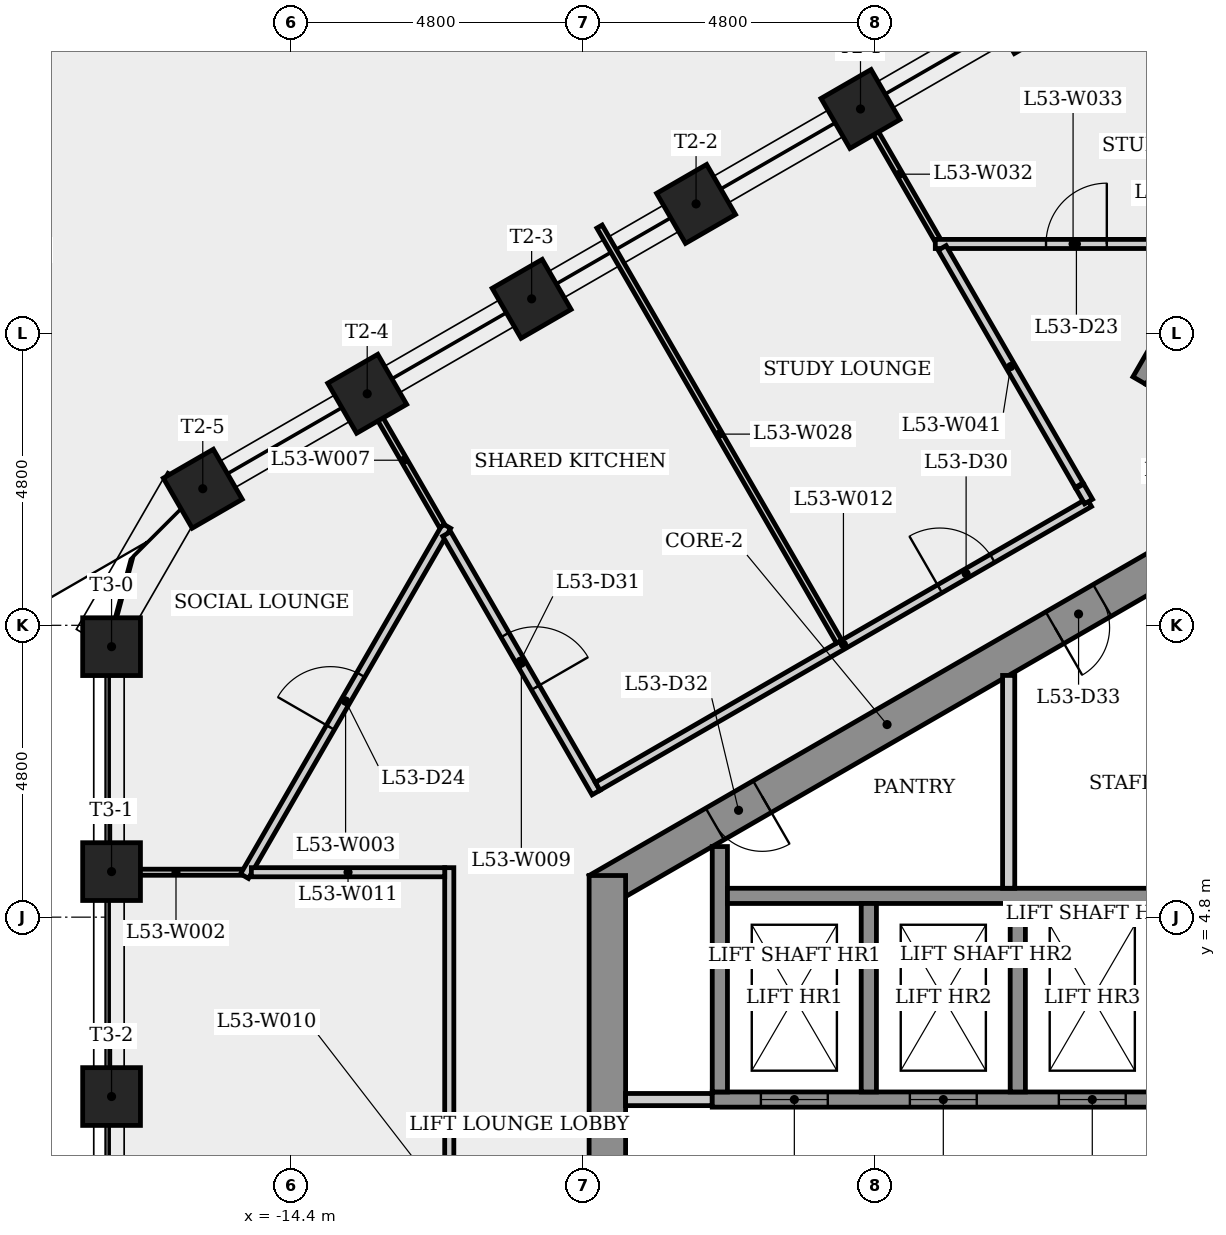
"""IFC4 building model, lengths in metres.
Left out: names, types, materials, properties, quantities, classifications, styles, units other than length and angle.
Written with IfcOpenShell. Run it as: python <this file> out.ifc"""

import sys

from ifc_helpers import new_model, si_unit, direction, frame, frame_2d, origin, origin_2d, place, context, subcontext, project, spatial, rectangle, extrude, element, fill, save


model = new_model("IFC4")
c1 = context("Model", 3, precision=1e-05, world=origin(), true_north=direction((0.0, 1.0)))
c2 = subcontext(c1, "Body", "Model", "MODEL_VIEW")
j1 = project(units=[si_unit("LENGTHUNIT", "METRE"), si_unit("PLANEANGLEUNIT", "RADIAN")], contexts=[c1])
p1 = place(None, origin())
s1 = spatial("IfcSite", under=j1, at=p1, CompositionType="ELEMENT")
p2 = place(p1, origin())
s2 = spatial("IfcBuilding", under=s1, at=p2, CompositionType="ELEMENT")
p3 = place(p2, frame((0.0, 0.0, 198.7)))
s3 = spatial("IfcBuildingStorey", under=s2, at=p3, CompositionType="ELEMENT", Elevation=198.7)
p4 = place(p3, frame((0.15, 10.71, 0.0), z_axis=(0.0, 0.0, 1.0), x_axis=(-0.866023993627, -0.500002442456, 0.0)))
e1 = element("IfcWall", 1, at=p4, inside=s3, PredefinedType="SHEAR", context=c2, shape_type="SweptSolid", body=[
    extrude(rectangle(XDim=10.97, YDim=0.6, at=frame_2d((5.485, 0.0))), origin(), (0.0, 0.0, 1.0), 3.4),
])
p5 = place(p4, frame((7.855, 0.0, 0.0)))
e2 = element("IfcOpeningElement", 2, at=p5, cuts=e1, PredefinedType="OPENING", context=c2, shape_type="SweptSolid", body=[
    extrude(rectangle(XDim=0.9, YDim=2.1, at=frame_2d((0.45, 1.05))), frame((0.0, 0.31, 0.0), z_axis=(0.0, -1.0, 0.0), x_axis=(1.0, 0.0, 0.0)), (0.0, 0.0, 1.0), 0.62),
])
p6 = place(p4, frame((1.398, 0.0, 0.0)))
e3 = element("IfcOpeningElement", 3, at=p6, cuts=e1, PredefinedType="OPENING", context=c2, shape_type="SweptSolid", body=[
    extrude(rectangle(XDim=0.9, YDim=2.1, at=frame_2d((0.45, 1.05))), frame((0.0, 0.31, 0.0), z_axis=(0.0, -1.0, 0.0), x_axis=(1.0, 0.0, 0.0)), (0.0, 0.0, 1.0), 0.62),
])
p7 = place(p3, frame((-9.2, 5.485, 0.0), z_axis=(0.0, 0.0, 1.0), x_axis=(0.0, -1.0, 0.0)))
e4 = element("IfcWall", 4, at=p7, inside=s3, PredefinedType="SHEAR", context=c2, shape_type="SweptSolid", body=[
    extrude(rectangle(XDim=10.97, YDim=0.6, at=frame_2d((5.485, 0.0))), origin(), (0.0, 0.0, 1.0), 3.4),
])
p8 = place(p7, frame((8.516, 0.0, 0.0)))
e5 = element("IfcOpeningElement", 5, at=p8, cuts=e4, PredefinedType="OPENING", context=c2, shape_type="SweptSolid", body=[
    extrude(rectangle(XDim=0.9, YDim=2.1, at=frame_2d((0.45, 1.05))), frame((0.0, 0.31, 0.0), z_axis=(0.0, -1.0, 0.0), x_axis=(1.0, 0.0, 0.0)), (0.0, 0.0, 1.0), 0.62),
])
p9 = place(p7, frame((4.685, 0.0, 0.0)))
e6 = element("IfcOpeningElement", 6, at=p9, cuts=e4, PredefinedType="OPENING", context=c2, shape_type="SweptSolid", body=[
    extrude(rectangle(XDim=1.6, YDim=2.1, at=frame_2d((0.8, 1.05))), frame((0.0, 0.31, 0.0), z_axis=(0.0, -1.0, 0.0), x_axis=(1.0, 0.0, 0.0)), (0.0, 0.0, 1.0), 0.62),
])
for number, where, z_axis, x_axis in (
    (7, (-2.333, 19.653, 0.0), (0.0, 0.0, 1.0), (-0.5, 0.866, 0.0)),
    (8, (-5.037, 18.092, 0.0), (0.0, 0.0, 1.0), (-0.5, 0.866, 0.0)),
    (9, (-7.741, 16.531, 0.0), (0.0, 0.0, 1.0), (-0.5, 0.866, 0.0)),
    (10, (-10.445, 14.969, 0.0), (0.0, 0.0, 1.0), (-0.5, 0.866, 0.0)),
    (11, (-13.15, 13.408, 0.0), (0.0, 0.0, 1.0), (-0.5, 0.866, 0.0)),
    (12, (-15.854, 11.847, 0.0), (0.0, 0.0, 1.0), (-0.5, 0.866, 0.0)),
    (13, (-17.354, 9.249, 0.0), (0.0, 0.0, 1.0), (-1.0, 0.0, 0.0)),
    (14, (-17.354, 5.549, 0.0), (0.0, 0.0, 1.0), (-1.0, 0.0, 0.0)),
    (15, (-17.354, 1.85, 0.0), (0.0, 0.0, 1.0), (-1.0, 0.0, 0.0)),
):
    element("IfcColumn", number, at=place(p3, frame(where, z_axis=z_axis, x_axis=x_axis)), inside=s3, PredefinedType="COLUMN", context=c2, shape_type="SweptSolid", body=[
        extrude(rectangle(XDim=0.95, YDim=0.95, at=origin_2d()), origin(), (0.0, 0.0, 1.0), 3.4),
    ])
p10 = place(p3, frame((-15.205, 5.539, 0.0), z_axis=(0.0, 0.0, 1.0), x_axis=(-1.0, 0.0, 0.0)))
e16 = element("IfcWall", 16, at=p10, inside=s3, PredefinedType="PARTITIONING", context=c2, shape_type="SweptSolid", body=[
    extrude(rectangle(XDim=2.179, YDim=0.1, at=frame_2d((1.089, 0.0))), origin(), (0.0, 0.0, 1.0), 3.0),
])
p11 = place(p3, frame((-15.167, 5.474, 0.0), z_axis=(0.0, 0.0, 1.0), x_axis=(0.500012717347, 0.866018061296, 0.0)))
e17 = element("IfcWall", 17, at=p11, inside=s3, PredefinedType="PARTITIONING", context=c2, shape_type="SweptSolid", body=[
    extrude(rectangle(XDim=6.65, YDim=0.15, at=frame_2d((3.325, 0.0))), origin(), (0.0, 0.0, 1.0), 3.0),
])
p12 = place(p11, frame((2.825, 0.0, 0.0)))
e18 = element("IfcOpeningElement", 18, at=p12, cuts=e17, PredefinedType="OPENING", context=c2, shape_type="SweptSolid", body=[
    extrude(rectangle(XDim=1.0, YDim=2.1, at=frame_2d((0.5, 1.05))), frame((0.0, 0.085, 0.0), z_axis=(0.0, -1.0, 0.0), x_axis=(1.0, 0.0, 0.0)), (0.0, 0.0, 1.0), 0.17),
])
p13 = place(p3, frame((-13.167, 13.398, 0.0), z_axis=(0.0, 0.0, 1.0), x_axis=(0.500046524342, -0.865998541277, 0.0)))
e19 = element("IfcWall", 19, at=p13, inside=s3, PredefinedType="PARTITIONING", context=c2, shape_type="SweptSolid", body=[
    extrude(rectangle(XDim=2.5, YDim=0.1, at=frame_2d((1.25, 0.0))), origin(), (0.0, 0.0, 1.0), 3.0),
])
p14 = place(p3, frame((-11.843, 11.103, 0.0), z_axis=(0.0, 0.0, 1.0), x_axis=(0.500015046984, -0.86601671623, 0.0)))
e20 = element("IfcWall", 20, at=p14, inside=s3, PredefinedType="PARTITIONING", context=c2, shape_type="SweptSolid", body=[
    extrude(rectangle(XDim=4.911, YDim=0.15, at=frame_2d((2.456, 0.0))), origin(), (0.0, 0.0, 1.0), 3.0),
])
p15 = place(p14, frame((1.918, 0.0, 0.0)))
e21 = element("IfcOpeningElement", 21, at=p15, cuts=e20, PredefinedType="OPENING", context=c2, shape_type="SweptSolid", body=[
    extrude(rectangle(XDim=1.0, YDim=2.1, at=frame_2d((0.5, 1.05))), frame((0.0, 0.085, 0.0), z_axis=(0.0, -1.0, 0.0), x_axis=(1.0, 0.0, 0.0)), (0.0, 0.0, 1.0), 0.17),
])
p16 = place(p3, frame((-11.8, -5.464, 0.0), z_axis=(0.0, 0.0, 1.0), x_axis=(0.0, 1.0, 0.0)))
e22 = element("IfcWall", 22, at=p16, inside=s3, PredefinedType="PARTITIONING", context=c2, shape_type="SweptSolid", body=[
    extrude(rectangle(XDim=11.078, YDim=0.15, at=frame_2d((5.539, 0.0))), origin(), (0.0, 0.0, 1.0), 3.0),
])
p17 = place(p16, frame((4.986, 0.0, 0.0)))
e23 = element("IfcOpeningElement", 23, at=p17, cuts=e22, PredefinedType="OPENING", context=c2, shape_type="SweptSolid", body=[
    extrude(rectangle(XDim=1.0, YDim=2.1, at=frame_2d((0.5, 1.05))), frame((0.0, 0.085, 0.0), z_axis=(0.0, -1.0, 0.0), x_axis=(1.0, 0.0, 0.0)), (0.0, 0.0, 1.0), 0.17),
])
p18 = place(p3, frame((-11.875, 5.539, 0.0), z_axis=(0.0, 0.0, 1.0), x_axis=(-1.0, 0.0, 0.0)))
e24 = element("IfcWall", 24, at=p18, inside=s3, PredefinedType="PARTITIONING", context=c2, shape_type="SweptSolid", body=[
    extrude(rectangle(XDim=3.18, YDim=0.15, at=frame_2d((1.59, 0.0))), origin(), (0.0, 0.0, 1.0), 3.0),
])
p19 = place(p3, frame((-9.359, 6.952, 0.0), z_axis=(0.0, 0.0, 1.0), x_axis=(0.866014841347, 0.500018294232, 0.0)))
e25 = element("IfcWall", 25, at=p19, inside=s3, PredefinedType="PARTITIONING", context=c2, shape_type="SweptSolid", body=[
    extrude(rectangle(XDim=9.334, YDim=0.15, at=frame_2d((4.667, 0.0))), origin(), (0.0, 0.0, 1.0), 3.0),
])
p20 = place(p19, frame((6.497, 0.0, 0.0)))
e26 = element("IfcOpeningElement", 26, at=p20, cuts=e25, PredefinedType="OPENING", context=c2, shape_type="SweptSolid", body=[
    extrude(rectangle(XDim=1.0, YDim=2.1, at=frame_2d((0.5, 1.05))), frame((0.0, 0.085, 0.0), z_axis=(0.0, -1.0, 0.0), x_axis=(1.0, 0.0, 0.0)), (0.0, 0.0, 1.0), 0.17),
])
p21 = place(p3, frame((-8.9, 1.8, 0.0), z_axis=(0.0, 0.0, 1.0), x_axis=(1.0, 0.0, 0.0)))
e27 = element("IfcWall", 27, at=p21, inside=s3, PredefinedType="PARTITIONING", context=c2, shape_type="SweptSolid", body=[
    extrude(rectangle(XDim=1.425, YDim=0.2, at=frame_2d((0.712, 0.0))), origin(), (0.0, 0.0, 1.0), 3.0),
])
p22 = place(p3, frame((-7.475, 1.8, 0.0), z_axis=(0.0, 0.0, 1.0), x_axis=(1.0, 0.0, 0.0)))
e28 = element("IfcWall", 28, at=p22, inside=s3, PredefinedType="SHEAR", context=c2, shape_type="SweptSolid", body=[
    extrude(rectangle(XDim=14.95, YDim=0.25, at=frame_2d((7.475, 0.0))), origin(), (0.0, 0.0, 1.0), 3.0),
])
p23 = place(p22, frame((0.8, 0.0, 0.0)))
e29 = element("IfcOpeningElement", 29, at=p23, cuts=e28, PredefinedType="OPENING", context=c2, shape_type="SweptSolid", body=[
    extrude(rectangle(XDim=1.1, YDim=2.1, at=frame_2d((0.55, 1.05))), frame((0.0, 0.135, 0.0), z_axis=(0.0, -1.0, 0.0), x_axis=(1.0, 0.0, 0.0)), (0.0, 0.0, 1.0), 0.27),
])
p24 = place(p22, frame((3.25, 0.0, 0.0)))
e30 = element("IfcOpeningElement", 30, at=p24, cuts=e28, PredefinedType="OPENING", context=c2, shape_type="SweptSolid", body=[
    extrude(rectangle(XDim=1.1, YDim=2.1, at=frame_2d((0.55, 1.05))), frame((0.0, 0.135, 0.0), z_axis=(0.0, -1.0, 0.0), x_axis=(1.0, 0.0, 0.0)), (0.0, 0.0, 1.0), 0.27),
])
p25 = place(p22, frame((5.7, 0.0, 0.0)))
e31 = element("IfcOpeningElement", 31, at=p25, cuts=e28, PredefinedType="OPENING", context=c2, shape_type="SweptSolid", body=[
    extrude(rectangle(XDim=1.1, YDim=2.1, at=frame_2d((0.55, 1.05))), frame((0.0, 0.135, 0.0), z_axis=(0.0, -1.0, 0.0), x_axis=(1.0, 0.0, 0.0)), (0.0, 0.0, 1.0), 0.27),
])
p26 = place(p22, frame((8.15, 0.0, 0.0)))
e32 = element("IfcOpeningElement", 32, at=p26, cuts=e28, PredefinedType="OPENING", context=c2, shape_type="SweptSolid", body=[
    extrude(rectangle(XDim=1.1, YDim=2.1, at=frame_2d((0.55, 1.05))), frame((0.0, 0.135, 0.0), z_axis=(0.0, -1.0, 0.0), x_axis=(1.0, 0.0, 0.0)), (0.0, 0.0, 1.0), 0.27),
])
p27 = place(p22, frame((10.6, 0.0, 0.0)))
e33 = element("IfcOpeningElement", 33, at=p27, cuts=e28, PredefinedType="OPENING", context=c2, shape_type="SweptSolid", body=[
    extrude(rectangle(XDim=1.1, YDim=2.1, at=frame_2d((0.55, 1.05))), frame((0.0, 0.135, 0.0), z_axis=(0.0, -1.0, 0.0), x_axis=(1.0, 0.0, 0.0)), (0.0, 0.0, 1.0), 0.27),
])
p28 = place(p22, frame((13.05, 0.0, 0.0)))
e34 = element("IfcOpeningElement", 34, at=p28, cuts=e28, PredefinedType="OPENING", context=c2, shape_type="SweptSolid", body=[
    extrude(rectangle(XDim=1.1, YDim=2.1, at=frame_2d((0.55, 1.05))), frame((0.0, 0.135, 0.0), z_axis=(0.0, -1.0, 0.0), x_axis=(1.0, 0.0, 0.0)), (0.0, 0.0, 1.0), 0.27),
])
p29 = place(p3, frame((-7.35, 1.925, 0.0), z_axis=(0.0, 0.0, 1.0), x_axis=(0.0, 1.0, 0.0)))
e35 = element("IfcWall", 35, at=p29, inside=s3, PredefinedType="SHEAR", context=c2, shape_type="SweptSolid", body=[
    extrude(rectangle(XDim=4.036, YDim=0.25, at=frame_2d((2.018, 0.0))), origin(), (0.0, 0.0, 1.0), 3.0),
])
p30 = place(p3, frame((-7.225, 5.15, 0.0), z_axis=(0.0, 0.0, 1.0), x_axis=(1.0, 0.0, 0.0)))
e36 = element("IfcWall", 36, at=p30, inside=s3, PredefinedType="SHEAR", context=c2, shape_type="SweptSolid", body=[
    extrude(rectangle(XDim=14.7, YDim=0.25, at=frame_2d((7.35, 0.0))), origin(), (0.0, 0.0, 1.0), 3.0),
])
p31 = place(p3, frame((-5.387, 9.331, 0.0), z_axis=(0.0, 0.0, 1.0), x_axis=(-0.500003060896, 0.866023636568, 0.0)))
e37 = element("IfcWall", 37, at=p31, inside=s3, PredefinedType="PARTITIONING", context=c2, shape_type="SweptSolid", body=[
    extrude(rectangle(XDim=7.883, YDim=0.1, at=frame_2d((3.941, 0.0))), origin(), (0.0, 0.0, 1.0), 3.0),
])
p32 = place(p3, frame((-4.9, 5.025, 0.0), z_axis=(0.0, 0.0, 1.0), x_axis=(0.0, -1.0, 0.0)))
e38 = element("IfcWall", 38, at=p32, inside=s3, PredefinedType="SHEAR", context=c2, shape_type="SweptSolid", body=[
    extrude(rectangle(XDim=3.1, YDim=0.25, at=frame_2d((1.55, 0.0))), origin(), (0.0, 0.0, 1.0), 3.4),
])
p33 = place(p3, frame((-3.769, 15.937, 0.0), z_axis=(0.0, 0.0, 1.0), x_axis=(-0.500004234368, 0.866022959057, 0.0)))
e39 = element("IfcWall", 39, at=p33, inside=s3, PredefinedType="PARTITIONING", context=c2, shape_type="SweptSolid", body=[
    extrude(rectangle(XDim=2.5, YDim=0.1, at=frame_2d((1.25, 0.0))), origin(), (0.0, 0.0, 1.0), 3.0),
])
p34 = place(p3, frame((-3.807, 15.872, 0.0), z_axis=(0.0, 0.0, 1.0), x_axis=(1.0, 0.0, 0.0)))
e40 = element("IfcWall", 40, at=p34, inside=s3, PredefinedType="PARTITIONING", context=c2, shape_type="SweptSolid", body=[
    extrude(rectangle(XDim=4.532, YDim=0.15, at=frame_2d((2.266, 0.0))), origin(), (0.0, 0.0, 1.0), 3.0),
])
p35 = place(p34, frame((1.821, 0.0, 0.0)))
e41 = element("IfcOpeningElement", 41, at=p35, cuts=e40, PredefinedType="OPENING", context=c2, shape_type="SweptSolid", body=[
    extrude(rectangle(XDim=1.0, YDim=2.1, at=frame_2d((0.5, 1.05))), frame((0.0, 0.085, 0.0), z_axis=(0.0, -1.0, 0.0), x_axis=(1.0, 0.0, 0.0)), (0.0, 0.0, 1.0), 0.17),
])
p36 = place(p3, frame((-2.6, 8.776, 0.0), z_axis=(0.0, 0.0, 1.0), x_axis=(0.0, -1.0, 0.0)))
e42 = element("IfcWall", 42, at=p36, inside=s3, PredefinedType="PARTITIONING", context=c2, shape_type="SweptSolid", body=[
    extrude(rectangle(XDim=3.501, YDim=0.2, at=frame_2d((1.75, 0.0))), origin(), (0.0, 0.0, 1.0), 3.0),
])
p37 = place(p3, frame((-2.45, 5.025, 0.0), z_axis=(0.0, 0.0, 1.0), x_axis=(0.0, -1.0, 0.0)))
e43 = element("IfcWall", 43, at=p37, inside=s3, PredefinedType="SHEAR", context=c2, shape_type="SweptSolid", body=[
    extrude(rectangle(XDim=3.1, YDim=0.25, at=frame_2d((1.55, 0.0))), origin(), (0.0, 0.0, 1.0), 3.4),
])
p38 = place(p3, frame((-1.441, 11.905, 0.0), z_axis=(0.0, 0.0, 1.0), x_axis=(-0.49997881468, 0.866037634789, 0.0)))
e44 = element("IfcWall", 44, at=p38, inside=s3, PredefinedType="PARTITIONING", context=c2, shape_type="SweptSolid", body=[
    extrude(rectangle(XDim=4.507, YDim=0.15, at=frame_2d((2.253, 0.0))), origin(), (0.0, 0.0, 1.0), 3.0),
])
p39 = place(p3, frame((-1.431, 11.887, 0.0), z_axis=(0.0, 0.0, 1.0), x_axis=(0.499941024108, -0.866059450854, 0.0)))
e45 = element("IfcWall", 45, at=p39, inside=s3, PredefinedType="PARTITIONING", context=c2, shape_type="SweptSolid", body=[
    extrude(rectangle(XDim=0.29, YDim=0.15, at=frame_2d((0.145, 0.0))), origin(), (0.0, 0.0, 1.0), 3.0),
])
p40 = place(p3, frame((-0.448, 13.624, 0.0), z_axis=(0.0, 0.0, 1.0), x_axis=(0.500037662692, 0.866003658127, 0.0)))
e46 = element("IfcWall", 46, at=p40, inside=s3, PredefinedType="SHEAR", context=c2, shape_type="SweptSolid", body=[
    extrude(rectangle(XDim=2.95, YDim=0.25, at=frame_2d((1.475, 0.0))), origin(), (0.0, 0.0, 1.0), 3.0),
])
p41 = place(p23, origin())
e47 = element("IfcDoor", 47, at=p41, inside=s3, OperationType="SLIDING_TO_LEFT", PredefinedType="DOOR", context=c2, shape_type="SweptSolid", body=[
    extrude(rectangle(XDim=1.1, YDim=2.1, at=frame_2d((0.55, 1.05))), frame((0.0, 0.025, 0.0), z_axis=(0.0, -1.0, 0.0), x_axis=(1.0, 0.0, 0.0)), (0.0, 0.0, 1.0), 0.05),
])
fill(e29, e47)
p42 = place(p24, origin())
e48 = element("IfcDoor", 48, at=p42, inside=s3, OperationType="SLIDING_TO_LEFT", PredefinedType="DOOR", context=c2, shape_type="SweptSolid", body=[
    extrude(rectangle(XDim=1.1, YDim=2.1, at=frame_2d((0.55, 1.05))), frame((0.0, 0.025, 0.0), z_axis=(0.0, -1.0, 0.0), x_axis=(1.0, 0.0, 0.0)), (0.0, 0.0, 1.0), 0.05),
])
fill(e30, e48)
p43 = place(p25, origin())
e49 = element("IfcDoor", 49, at=p43, inside=s3, OperationType="SLIDING_TO_LEFT", PredefinedType="DOOR", context=c2, shape_type="SweptSolid", body=[
    extrude(rectangle(XDim=1.1, YDim=2.1, at=frame_2d((0.55, 1.05))), frame((0.0, 0.025, 0.0), z_axis=(0.0, -1.0, 0.0), x_axis=(1.0, 0.0, 0.0)), (0.0, 0.0, 1.0), 0.05),
])
fill(e31, e49)
p44 = place(p35, origin())
e50 = element("IfcDoor", 50, at=p44, inside=s3, OperationType="SINGLE_SWING_RIGHT", PredefinedType="DOOR", context=c2, shape_type="SweptSolid", body=[
    extrude(rectangle(XDim=1.0, YDim=2.1, at=frame_2d((0.5, 1.05))), frame((0.0, 0.025, 0.0), z_axis=(0.0, -1.0, 0.0), x_axis=(1.0, 0.0, 0.0)), (0.0, 0.0, 1.0), 0.05),
])
fill(e41, e50)
p45 = place(p12, origin())
e51 = element("IfcDoor", 51, at=p45, inside=s3, OperationType="SINGLE_SWING_LEFT", PredefinedType="DOOR", context=c2, shape_type="SweptSolid", body=[
    extrude(rectangle(XDim=1.0, YDim=2.1, at=frame_2d((0.5, 1.05))), frame((0.0, 0.025, 0.0), z_axis=(0.0, -1.0, 0.0), x_axis=(1.0, 0.0, 0.0)), (0.0, 0.0, 1.0), 0.05),
])
fill(e18, e51)
p46 = place(p20, origin())
e52 = element("IfcDoor", 52, at=p46, inside=s3, OperationType="SINGLE_SWING_LEFT", PredefinedType="DOOR", context=c2, shape_type="SweptSolid", body=[
    extrude(rectangle(XDim=1.0, YDim=2.1, at=frame_2d((0.5, 1.05))), frame((0.0, 0.025, 0.0), z_axis=(0.0, -1.0, 0.0), x_axis=(1.0, 0.0, 0.0)), (0.0, 0.0, 1.0), 0.05),
])
fill(e26, e52)
p47 = place(p15, origin())
e53 = element("IfcDoor", 53, at=p47, inside=s3, OperationType="SINGLE_SWING_RIGHT", PredefinedType="DOOR", context=c2, shape_type="SweptSolid", body=[
    extrude(rectangle(XDim=1.0, YDim=2.1, at=frame_2d((0.5, 1.05))), frame((0.0, 0.025, 0.0), z_axis=(0.0, -1.0, 0.0), x_axis=(1.0, 0.0, 0.0)), (0.0, 0.0, 1.0), 0.05),
])
fill(e21, e53)
p48 = place(p5, origin())
e54 = element("IfcDoor", 54, at=p48, inside=s3, OperationType="SINGLE_SWING_LEFT", PredefinedType="DOOR", context=c2, shape_type="SweptSolid", body=[
    extrude(rectangle(XDim=0.9, YDim=2.1, at=frame_2d((0.45, 1.05))), frame((0.0, 0.025, 0.0), z_axis=(0.0, -1.0, 0.0), x_axis=(1.0, 0.0, 0.0)), (0.0, 0.0, 1.0), 0.05),
])
fill(e2, e54)
p49 = place(p6, origin())
e55 = element("IfcDoor", 55, at=p49, inside=s3, OperationType="SINGLE_SWING_RIGHT", PredefinedType="DOOR", context=c2, shape_type="SweptSolid", body=[
    extrude(rectangle(XDim=0.9, YDim=2.1, at=frame_2d((0.45, 1.05))), frame((0.0, 0.025, 0.0), z_axis=(0.0, -1.0, 0.0), x_axis=(1.0, 0.0, 0.0)), (0.0, 0.0, 1.0), 0.05),
])
fill(e3, e55)
save(model, sys.argv[1])
